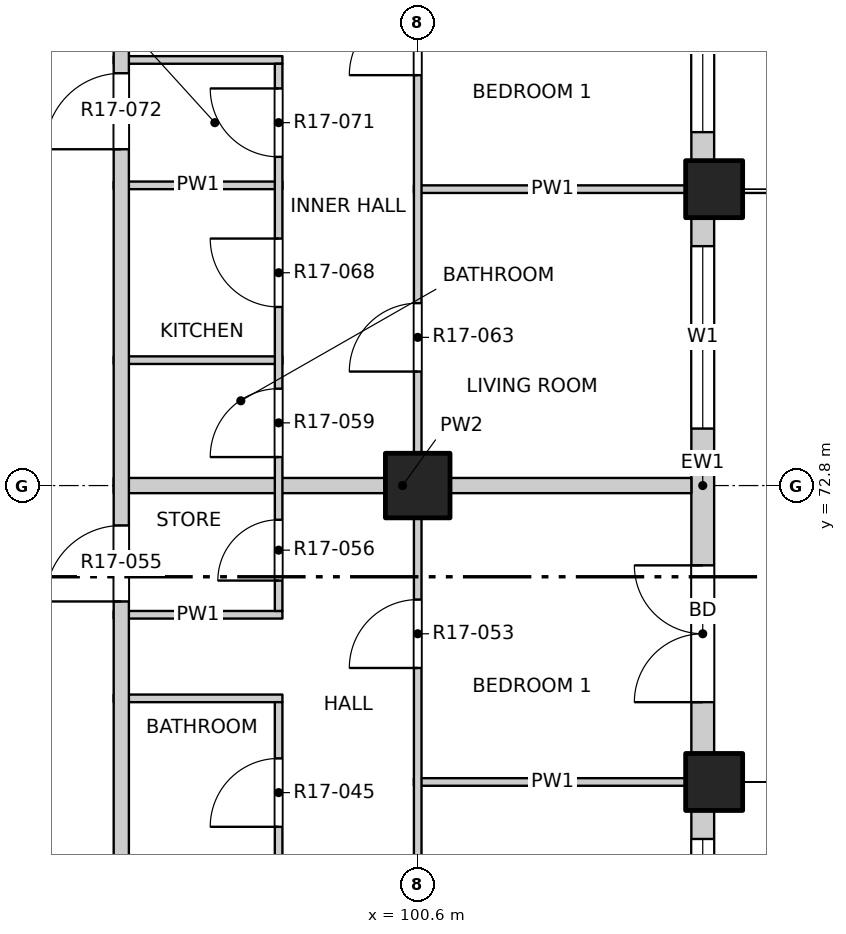
"""IFC4 building model, lengths in metres.
Left out: names, types, materials, properties, quantities, classifications, styles, units other than length and angle.
Written with IfcOpenShell. Run it as: python <this file> out.ifc"""

import sys

from ifc_helpers import new_model, si_unit, direction, frame, frame_2d, origin, origin_2d, place, context, subcontext, project, spatial, rectangle, extrude, element, fill, save


model = new_model("IFC4")
c1 = context("Model", 3, precision=1e-05, world=origin(), true_north=direction((0.0, 1.0)))
c2 = subcontext(c1, "Body", "Model", "MODEL_VIEW")
j1 = project(units=[si_unit("LENGTHUNIT", "METRE"), si_unit("PLANEANGLEUNIT", "RADIAN")], contexts=[c1])
p1 = place(None, origin())
s1 = spatial("IfcSite", under=j1, at=p1, CompositionType="ELEMENT")
p2 = place(p1, origin())
s2 = spatial("IfcBuilding", under=s1, at=p2, CompositionType="ELEMENT")
p3 = place(p2, frame((0.0, 0.0, 179.2)))
s3 = spatial("IfcBuildingStorey", under=s2, at=p3, CompositionType="ELEMENT", Elevation=179.2)
for number, where, z_axis, x_axis in (
    (1, (104.5, 68.9, -0.3), (0.0, 0.0, 1.0), (1.0, 0.0, 0.0)),
    (2, (104.5, 76.7, -0.3), (0.0, 0.0, 1.0), (1.0, 0.0, 0.0)),
):
    element("IfcColumn", number, at=place(p3, frame(where, z_axis=z_axis, x_axis=x_axis)), inside=s3, PredefinedType="COLUMN", context=c2, shape_type="SweptSolid", body=[
        extrude(rectangle(XDim=0.75, YDim=0.75, at=origin_2d()), origin(), (0.0, 0.0, 1.0), 3.45),
    ])
p4 = place(p3, frame((100.6, 72.8, -0.3), z_axis=(0.0, 0.0, 1.0), x_axis=(1.0, 0.0, 0.0)))
e3 = element("IfcColumn", 3, at=p4, inside=s3, PredefinedType="COLUMN", context=c2, shape_type="SweptSolid", body=[
    extrude(rectangle(XDim=0.85, YDim=0.85, at=origin_2d()), origin(), (0.0, 0.0, 1.0), 3.45),
])
p5 = place(p3, frame((104.35, 61.475, 0.0), z_axis=(0.0, 0.0, 1.0), x_axis=(0.0, 1.0, 0.0)))
e4 = element("IfcWall", 4, at=p5, inside=s3, PredefinedType="SOLIDWALL", context=c2, shape_type="SweptSolid", body=[
    extrude(rectangle(XDim=7.05, YDim=0.3, at=frame_2d((3.525, 0.0))), origin(), (0.0, 0.0, 1.0), 2.7),
])
p6 = place(p5, frame((0.675, 0.0, 0.0)))
e5 = element("IfcOpeningElement", 5, at=p6, cuts=e4, PredefinedType="OPENING", context=c2, shape_type="SweptSolid", body=[
    extrude(rectangle(XDim=1.8, YDim=2.4, at=frame_2d((0.9, 1.2))), frame((0.0, 0.16, 0.0), z_axis=(0.0, -1.0, 0.0), x_axis=(1.0, 0.0, 0.0)), (0.0, 0.0, 1.0), 0.32),
])
p7 = place(p5, frame((4.275, 0.0, 0.9)))
e6 = element("IfcOpeningElement", 6, at=p7, cuts=e4, PredefinedType="OPENING", context=c2, shape_type="SweptSolid", body=[
    extrude(rectangle(XDim=2.4, YDim=1.8, at=frame_2d((1.2, 0.9))), frame((0.0, 0.16, 0.0), z_axis=(0.0, -1.0, 0.0), x_axis=(1.0, 0.0, 0.0)), (0.0, 0.0, 1.0), 0.32),
])
p8 = place(p3, frame((104.35, 69.275, 0.0), z_axis=(0.0, 0.0, 1.0), x_axis=(0.0, 1.0, 0.0)))
e7 = element("IfcWall", 7, at=p8, inside=s3, PredefinedType="SOLIDWALL", context=c2, shape_type="SweptSolid", body=[
    extrude(rectangle(XDim=7.05, YDim=0.3, at=frame_2d((3.525, 0.0))), origin(), (0.0, 0.0, 1.0), 2.7),
])
p9 = place(p8, frame((0.675, 0.0, 0.0)))
e8 = element("IfcOpeningElement", 8, at=p9, cuts=e7, PredefinedType="OPENING", context=c2, shape_type="SweptSolid", body=[
    extrude(rectangle(XDim=1.8, YDim=2.4, at=frame_2d((0.9, 1.2))), frame((0.0, 0.16, 0.0), z_axis=(0.0, -1.0, 0.0), x_axis=(1.0, 0.0, 0.0)), (0.0, 0.0, 1.0), 0.32),
])
p10 = place(p8, frame((4.275, 0.0, 0.9)))
e9 = element("IfcOpeningElement", 9, at=p10, cuts=e7, PredefinedType="OPENING", context=c2, shape_type="SweptSolid", body=[
    extrude(rectangle(XDim=2.4, YDim=1.8, at=frame_2d((1.2, 0.9))), frame((0.0, 0.16, 0.0), z_axis=(0.0, -1.0, 0.0), x_axis=(1.0, 0.0, 0.0)), (0.0, 0.0, 1.0), 0.32),
])
p11 = place(p3, frame((104.35, 77.075, 0.0), z_axis=(0.0, 0.0, 1.0), x_axis=(0.0, 1.0, 0.0)))
e10 = element("IfcWall", 10, at=p11, inside=s3, PredefinedType="SOLIDWALL", context=c2, shape_type="SweptSolid", body=[
    extrude(rectangle(XDim=3.525, YDim=0.3, at=frame_2d((1.763, 0.0))), origin(), (0.0, 0.0, 1.0), 2.7),
])
p12 = place(p11, frame((0.375, 0.0, 0.9)))
e11 = element("IfcOpeningElement", 11, at=p12, cuts=e10, PredefinedType="OPENING", context=c2, shape_type="SweptSolid", body=[
    extrude(rectangle(XDim=2.4, YDim=1.8, at=frame_2d((1.2, 0.9))), frame((0.0, 0.16, 0.0), z_axis=(0.0, -1.0, 0.0), x_axis=(1.0, 0.0, 0.0)), (0.0, 0.0, 1.0), 0.32),
])
p13 = place(p3, frame((100.55, 68.9, 0.0), z_axis=(0.0, 0.0, 1.0), x_axis=(1.0, 0.0, 0.0)))
e12 = element("IfcWall", 12, at=p13, inside=s3, PredefinedType="PARTITIONING", context=c2, shape_type="SweptSolid", body=[
    extrude(rectangle(XDim=3.65, YDim=0.1, at=frame_2d((1.825, 0.0))), origin(), (0.0, 0.0, 1.0), 2.55),
])
for number, where, z_axis, x_axis in (
    (13, (96.6, 70.0, 0.0), (0.0, 0.0, 1.0), (1.0, 0.0, 0.0)),
    (14, (96.6, 71.1, 0.0), (0.0, 0.0, 1.0), (1.0, 0.0, 0.0)),
):
    element("IfcWall", number, at=place(p3, frame(where, z_axis=z_axis, x_axis=x_axis)), inside=s3, PredefinedType="PARTITIONING", context=c2, shape_type="SweptSolid", body=[
        extrude(rectangle(XDim=2.22, YDim=0.1, at=frame_2d((1.11, 0.0))), origin(), (0.0, 0.0, 1.0), 3.15),
    ])
p14 = place(p3, frame((96.6, 72.8, 0.0), z_axis=(0.0, 0.0, 1.0), x_axis=(1.0, 0.0, 0.0)))
e15 = element("IfcWall", 15, at=p14, inside=s3, PredefinedType="PARTITIONING", context=c2, shape_type="SweptSolid", body=[
    extrude(rectangle(XDim=7.6, YDim=0.2, at=frame_2d((3.8, 0.0))), origin(), (0.0, 0.0, 1.0), 3.15),
])
p15 = place(p3, frame((96.6, 74.45, 0.0), z_axis=(0.0, 0.0, 1.0), x_axis=(1.0, 0.0, 0.0)))
e16 = element("IfcWall", 16, at=p15, inside=s3, PredefinedType="PARTITIONING", context=c2, shape_type="SweptSolid", body=[
    extrude(rectangle(XDim=2.22, YDim=0.1, at=frame_2d((1.11, 0.0))), origin(), (0.0, 0.0, 1.0), 3.15),
])
p16 = place(p3, frame((100.55, 76.7, 0.0), z_axis=(0.0, 0.0, 1.0), x_axis=(1.0, 0.0, 0.0)))
e17 = element("IfcWall", 17, at=p16, inside=s3, PredefinedType="PARTITIONING", context=c2, shape_type="SweptSolid", body=[
    extrude(rectangle(XDim=3.65, YDim=0.1, at=frame_2d((1.825, 0.0))), origin(), (0.0, 0.0, 1.0), 2.55),
])
p17 = place(p3, frame((96.6, 76.75, 0.0), z_axis=(0.0, 0.0, 1.0), x_axis=(1.0, 0.0, 0.0)))
e18 = element("IfcWall", 18, at=p17, inside=s3, PredefinedType="PARTITIONING", context=c2, shape_type="SweptSolid", body=[
    extrude(rectangle(XDim=2.22, YDim=0.1, at=frame_2d((1.11, 0.0))), origin(), (0.0, 0.0, 1.0), 2.55),
])
p18 = place(p3, frame((96.6, 78.4, 0.0), z_axis=(0.0, 0.0, 1.0), x_axis=(1.0, 0.0, 0.0)))
e19 = element("IfcWall", 19, at=p18, inside=s3, PredefinedType="PARTITIONING", context=c2, shape_type="SweptSolid", body=[
    extrude(rectangle(XDim=2.22, YDim=0.1, at=frame_2d((1.11, 0.0))), origin(), (0.0, 0.0, 1.0), 3.15),
])
p19 = place(p3, frame((96.7, 49.5, 0.0), z_axis=(0.0, 0.0, 1.0), x_axis=(0.0, 1.0, 0.0)))
e20 = element("IfcWall", 20, at=p19, inside=s3, PredefinedType="PARTITIONING", context=c2, shape_type="SweptSolid", body=[
    extrude(rectangle(XDim=34.7, YDim=0.2, at=frame_2d((17.35, 0.0))), origin(), (0.0, 0.0, 1.0), 3.15),
])
p20 = place(p19, frame((6.875, 0.0, 0.0)))
e21 = element("IfcOpeningElement", 21, at=p20, cuts=e20, PredefinedType="OPENING", context=c2, shape_type="SweptSolid", body=[
    extrude(rectangle(XDim=1.0, YDim=2.1, at=frame_2d((0.5, 1.05))), frame((0.0, 0.11, 0.0), z_axis=(0.0, -1.0, 0.0), x_axis=(1.0, 0.0, 0.0)), (0.0, 0.0, 1.0), 0.22),
])
p21 = place(p19, frame((21.775, 0.0, 0.0)))
e22 = element("IfcOpeningElement", 22, at=p21, cuts=e20, PredefinedType="OPENING", context=c2, shape_type="SweptSolid", body=[
    extrude(rectangle(XDim=1.0, YDim=2.1, at=frame_2d((0.5, 1.05))), frame((0.0, 0.11, 0.0), z_axis=(0.0, -1.0, 0.0), x_axis=(1.0, 0.0, 0.0)), (0.0, 0.0, 1.0), 0.22),
])
p22 = place(p19, frame((27.725, 0.0, 0.0)))
e23 = element("IfcOpeningElement", 23, at=p22, cuts=e20, PredefinedType="OPENING", context=c2, shape_type="SweptSolid", body=[
    extrude(rectangle(XDim=1.0, YDim=2.1, at=frame_2d((0.5, 1.05))), frame((0.0, 0.11, 0.0), z_axis=(0.0, -1.0, 0.0), x_axis=(1.0, 0.0, 0.0)), (0.0, 0.0, 1.0), 0.22),
])
p23 = place(p3, frame((98.77, 56.25, 0.0), z_axis=(0.0, 0.0, 1.0), x_axis=(0.0, 1.0, 0.0)))
e24 = element("IfcWall", 24, at=p23, inside=s3, PredefinedType="PARTITIONING", context=c2, shape_type="SweptSolid", body=[
    extrude(rectangle(XDim=13.7, YDim=0.1, at=frame_2d((6.85, 0.0))), origin(), (0.0, 0.0, 1.0), 3.15),
])
p24 = place(p23, frame((0.325, 0.0, 0.0)))
e25 = element("IfcOpeningElement", 25, at=p24, cuts=e24, PredefinedType="OPENING", context=c2, shape_type="SweptSolid", body=[
    extrude(rectangle(XDim=0.8, YDim=2.1, at=frame_2d((0.4, 1.05))), frame((0.0, 0.06, 0.0), z_axis=(0.0, -1.0, 0.0), x_axis=(1.0, 0.0, 0.0)), (0.0, 0.0, 1.0), 0.12),
])
p25 = place(p23, frame((1.95, 0.0, 0.0)))
e26 = element("IfcOpeningElement", 26, at=p25, cuts=e24, PredefinedType="OPENING", context=c2, shape_type="SweptSolid", body=[
    extrude(rectangle(XDim=0.9, YDim=2.1, at=frame_2d((0.45, 1.05))), frame((0.0, 0.06, 0.0), z_axis=(0.0, -1.0, 0.0), x_axis=(1.0, 0.0, 0.0)), (0.0, 0.0, 1.0), 0.12),
])
p26 = place(p23, frame((3.675, 0.0, 0.0)))
e27 = element("IfcOpeningElement", 27, at=p26, cuts=e24, PredefinedType="OPENING", context=c2, shape_type="SweptSolid", body=[
    extrude(rectangle(XDim=0.8, YDim=2.1, at=frame_2d((0.4, 1.05))), frame((0.0, 0.06, 0.0), z_axis=(0.0, -1.0, 0.0), x_axis=(1.0, 0.0, 0.0)), (0.0, 0.0, 1.0), 0.12),
])
p27 = place(p23, frame((6.16, 0.0, 0.0)))
e28 = element("IfcOpeningElement", 28, at=p27, cuts=e24, PredefinedType="OPENING", context=c2, shape_type="SweptSolid", body=[
    extrude(rectangle(XDim=0.9, YDim=2.1, at=frame_2d((0.45, 1.05))), frame((0.0, 0.06, 0.0), z_axis=(0.0, -1.0, 0.0), x_axis=(1.0, 0.0, 0.0)), (0.0, 0.0, 1.0), 0.12),
])
p28 = place(p23, frame((9.42, 0.0, 0.0)))
e29 = element("IfcOpeningElement", 29, at=p28, cuts=e24, PredefinedType="OPENING", context=c2, shape_type="SweptSolid", body=[
    extrude(rectangle(XDim=0.8, YDim=2.1, at=frame_2d((0.4, 1.05))), frame((0.0, 0.06, 0.0), z_axis=(0.0, -1.0, 0.0), x_axis=(1.0, 0.0, 0.0)), (0.0, 0.0, 1.0), 0.12),
])
p29 = place(p23, frame((12.06, 0.0, 0.0)))
e30 = element("IfcOpeningElement", 30, at=p29, cuts=e24, PredefinedType="OPENING", context=c2, shape_type="SweptSolid", body=[
    extrude(rectangle(XDim=0.9, YDim=2.1, at=frame_2d((0.45, 1.05))), frame((0.0, 0.06, 0.0), z_axis=(0.0, -1.0, 0.0), x_axis=(1.0, 0.0, 0.0)), (0.0, 0.0, 1.0), 0.12),
])
p30 = place(p3, frame((98.77, 71.15, 0.0), z_axis=(0.0, 0.0, 1.0), x_axis=(0.0, 1.0, 0.0)))
e31 = element("IfcWall", 31, at=p30, inside=s3, PredefinedType="PARTITIONING", context=c2, shape_type="SweptSolid", body=[
    extrude(rectangle(XDim=7.2, YDim=0.1, at=frame_2d((3.6, 0.0))), origin(), (0.0, 0.0, 1.0), 3.15),
])
p31 = place(p30, frame((0.4, 0.0, 0.0)))
e32 = element("IfcOpeningElement", 32, at=p31, cuts=e31, PredefinedType="OPENING", context=c2, shape_type="SweptSolid", body=[
    extrude(rectangle(XDim=0.8, YDim=2.1, at=frame_2d((0.4, 1.05))), frame((0.0, 0.06, 0.0), z_axis=(0.0, -1.0, 0.0), x_axis=(1.0, 0.0, 0.0)), (0.0, 0.0, 1.0), 0.12),
])
p32 = place(p30, frame((2.025, 0.0, 0.0)))
e33 = element("IfcOpeningElement", 33, at=p32, cuts=e31, PredefinedType="OPENING", context=c2, shape_type="SweptSolid", body=[
    extrude(rectangle(XDim=0.9, YDim=2.1, at=frame_2d((0.45, 1.05))), frame((0.0, 0.06, 0.0), z_axis=(0.0, -1.0, 0.0), x_axis=(1.0, 0.0, 0.0)), (0.0, 0.0, 1.0), 0.12),
])
p33 = place(p30, frame((4.0, 0.0, 0.0)))
e34 = element("IfcOpeningElement", 34, at=p33, cuts=e31, PredefinedType="OPENING", context=c2, shape_type="SweptSolid", body=[
    extrude(rectangle(XDim=0.9, YDim=2.1, at=frame_2d((0.45, 1.05))), frame((0.0, 0.06, 0.0), z_axis=(0.0, -1.0, 0.0), x_axis=(1.0, 0.0, 0.0)), (0.0, 0.0, 1.0), 0.12),
])
p34 = place(p30, frame((5.975, 0.0, 0.0)))
e35 = element("IfcOpeningElement", 35, at=p34, cuts=e31, PredefinedType="OPENING", context=c2, shape_type="SweptSolid", body=[
    extrude(rectangle(XDim=0.9, YDim=2.1, at=frame_2d((0.45, 1.05))), frame((0.0, 0.06, 0.0), z_axis=(0.0, -1.0, 0.0), x_axis=(1.0, 0.0, 0.0)), (0.0, 0.0, 1.0), 0.12),
])
p35 = place(p3, frame((100.6, 45.8, 0.0), z_axis=(0.0, 0.0, 1.0), x_axis=(0.0, 1.0, 0.0)))
e36 = element("IfcWall", 36, at=p35, inside=s3, PredefinedType="PARTITIONING", context=c2, shape_type="SweptSolid", body=[
    extrude(rectangle(XDim=38.4, YDim=0.1, at=frame_2d((19.2, 0.0))), origin(), (0.0, 0.0, 1.0), 3.15),
])
p36 = place(p35, frame((1.05, 0.0, 0.0)))
e37 = element("IfcOpeningElement", 37, at=p36, cuts=e36, PredefinedType="OPENING", context=c2, shape_type="SweptSolid", body=[
    extrude(rectangle(XDim=1.2, YDim=2.1, at=frame_2d((0.6, 1.05))), frame((0.0, 0.06, 0.0), z_axis=(0.0, -1.0, 0.0), x_axis=(1.0, 0.0, 0.0)), (0.0, 0.0, 1.0), 0.12),
])
p37 = place(p35, frame((5.1, 0.0, 0.0)))
e38 = element("IfcOpeningElement", 38, at=p37, cuts=e36, PredefinedType="OPENING", context=c2, shape_type="SweptSolid", body=[
    extrude(rectangle(XDim=0.9, YDim=2.1, at=frame_2d((0.45, 1.05))), frame((0.0, 0.06, 0.0), z_axis=(0.0, -1.0, 0.0), x_axis=(1.0, 0.0, 0.0)), (0.0, 0.0, 1.0), 0.12),
])
p38 = place(p35, frame((9.0, 0.0, 0.0)))
e39 = element("IfcOpeningElement", 39, at=p38, cuts=e36, PredefinedType="OPENING", context=c2, shape_type="SweptSolid", body=[
    extrude(rectangle(XDim=0.9, YDim=2.1, at=frame_2d((0.45, 1.05))), frame((0.0, 0.06, 0.0), z_axis=(0.0, -1.0, 0.0), x_axis=(1.0, 0.0, 0.0)), (0.0, 0.0, 1.0), 0.12),
])
p39 = place(p35, frame((12.9, 0.0, 0.0)))
e40 = element("IfcOpeningElement", 40, at=p39, cuts=e36, PredefinedType="OPENING", context=c2, shape_type="SweptSolid", body=[
    extrude(rectangle(XDim=0.9, YDim=2.1, at=frame_2d((0.45, 1.05))), frame((0.0, 0.06, 0.0), z_axis=(0.0, -1.0, 0.0), x_axis=(1.0, 0.0, 0.0)), (0.0, 0.0, 1.0), 0.12),
])
p40 = place(p35, frame((19.725, 0.0, 0.0)))
e41 = element("IfcOpeningElement", 41, at=p40, cuts=e36, PredefinedType="OPENING", context=c2, shape_type="SweptSolid", body=[
    extrude(rectangle(XDim=1.2, YDim=2.1, at=frame_2d((0.6, 1.05))), frame((0.0, 0.06, 0.0), z_axis=(0.0, -1.0, 0.0), x_axis=(1.0, 0.0, 0.0)), (0.0, 0.0, 1.0), 0.12),
])
p41 = place(p35, frame((24.6, 0.0, 0.0)))
e42 = element("IfcOpeningElement", 42, at=p41, cuts=e36, PredefinedType="OPENING", context=c2, shape_type="SweptSolid", body=[
    extrude(rectangle(XDim=0.9, YDim=2.1, at=frame_2d((0.45, 1.05))), frame((0.0, 0.06, 0.0), z_axis=(0.0, -1.0, 0.0), x_axis=(1.0, 0.0, 0.0)), (0.0, 0.0, 1.0), 0.12),
])
p42 = place(p35, frame((28.5, 0.0, 0.0)))
e43 = element("IfcOpeningElement", 43, at=p42, cuts=e36, PredefinedType="OPENING", context=c2, shape_type="SweptSolid", body=[
    extrude(rectangle(XDim=0.9, YDim=2.1, at=frame_2d((0.45, 1.05))), frame((0.0, 0.06, 0.0), z_axis=(0.0, -1.0, 0.0), x_axis=(1.0, 0.0, 0.0)), (0.0, 0.0, 1.0), 0.12),
])
p43 = place(p35, frame((32.4, 0.0, 0.0)))
e44 = element("IfcOpeningElement", 44, at=p43, cuts=e36, PredefinedType="OPENING", context=c2, shape_type="SweptSolid", body=[
    extrude(rectangle(XDim=0.9, YDim=2.1, at=frame_2d((0.45, 1.05))), frame((0.0, 0.06, 0.0), z_axis=(0.0, -1.0, 0.0), x_axis=(1.0, 0.0, 0.0)), (0.0, 0.0, 1.0), 0.12),
])
p44 = place(p35, frame((36.15, 0.0, 0.0)))
e45 = element("IfcOpeningElement", 45, at=p44, cuts=e36, PredefinedType="OPENING", context=c2, shape_type="SweptSolid", body=[
    extrude(rectangle(XDim=1.2, YDim=2.1, at=frame_2d((0.6, 1.05))), frame((0.0, 0.06, 0.0), z_axis=(0.0, -1.0, 0.0), x_axis=(1.0, 0.0, 0.0)), (0.0, 0.0, 1.0), 0.12),
])
p45 = place(p7, origin())
e46 = element("IfcWindow", 46, at=p45, inside=s3, PartitioningType="DOUBLE_PANEL_VERTICAL", PredefinedType="WINDOW", context=c2, shape_type="SweptSolid", body=[
    extrude(rectangle(XDim=2.4, YDim=1.8, at=frame_2d((1.2, 0.9))), frame((0.0, 0.03, 0.0), z_axis=(0.0, -1.0, 0.0), x_axis=(1.0, 0.0, 0.0)), (0.0, 0.0, 1.0), 0.06),
])
fill(e6, e46)
p46 = place(p9, origin())
e47 = element("IfcDoor", 47, at=p46, inside=s3, OperationType="DOUBLE_DOOR_SINGLE_SWING", PredefinedType="DOOR", context=c2, shape_type="SweptSolid", body=[
    extrude(rectangle(XDim=1.8, YDim=2.4, at=frame_2d((0.9, 1.2))), frame((0.0, 0.025, 0.0), z_axis=(0.0, -1.0, 0.0), x_axis=(1.0, 0.0, 0.0)), (0.0, 0.0, 1.0), 0.05),
])
fill(e8, e47)
p47 = place(p10, origin())
e48 = element("IfcWindow", 48, at=p47, inside=s3, PartitioningType="DOUBLE_PANEL_VERTICAL", PredefinedType="WINDOW", context=c2, shape_type="SweptSolid", body=[
    extrude(rectangle(XDim=2.4, YDim=1.8, at=frame_2d((1.2, 0.9))), frame((0.0, 0.03, 0.0), z_axis=(0.0, -1.0, 0.0), x_axis=(1.0, 0.0, 0.0)), (0.0, 0.0, 1.0), 0.06),
])
fill(e9, e48)
p48 = place(p12, origin())
e49 = element("IfcWindow", 49, at=p48, inside=s3, PartitioningType="DOUBLE_PANEL_VERTICAL", PredefinedType="WINDOW", context=c2, shape_type="SweptSolid", body=[
    extrude(rectangle(XDim=2.4, YDim=1.8, at=frame_2d((1.2, 0.9))), frame((0.0, 0.03, 0.0), z_axis=(0.0, -1.0, 0.0), x_axis=(1.0, 0.0, 0.0)), (0.0, 0.0, 1.0), 0.06),
])
fill(e11, e49)
p49 = place(p29, origin())
e50 = element("IfcDoor", 50, at=p49, inside=s3, OperationType="SINGLE_SWING_LEFT", PredefinedType="DOOR", context=c2, shape_type="SweptSolid", body=[
    extrude(rectangle(XDim=0.9, YDim=2.1, at=frame_2d((0.45, 1.05))), frame((0.0, 0.025, 0.0), z_axis=(0.0, -1.0, 0.0), x_axis=(1.0, 0.0, 0.0)), (0.0, 0.0, 1.0), 0.05),
])
fill(e30, e50)
p50 = place(p41, origin())
e51 = element("IfcDoor", 51, at=p50, inside=s3, OperationType="SINGLE_SWING_LEFT", PredefinedType="DOOR", context=c2, shape_type="SweptSolid", body=[
    extrude(rectangle(XDim=0.9, YDim=2.1, at=frame_2d((0.45, 1.05))), frame((0.0, 0.025, 0.0), z_axis=(0.0, -1.0, 0.0), x_axis=(1.0, 0.0, 0.0)), (0.0, 0.0, 1.0), 0.05),
])
fill(e42, e51)
p51 = place(p21, origin())
e52 = element("IfcDoor", 52, at=p51, inside=s3, OperationType="SINGLE_SWING_LEFT", PredefinedType="DOOR", context=c2, shape_type="SweptSolid", body=[
    extrude(rectangle(XDim=1.0, YDim=2.1, at=frame_2d((0.5, 1.05))), frame((0.0, 0.025, 0.0), z_axis=(0.0, -1.0, 0.0), x_axis=(1.0, 0.0, 0.0)), (0.0, 0.0, 1.0), 0.05),
])
fill(e22, e52)
p52 = place(p31, origin())
e53 = element("IfcDoor", 53, at=p52, inside=s3, OperationType="SINGLE_SWING_LEFT", PredefinedType="DOOR", context=c2, shape_type="SweptSolid", body=[
    extrude(rectangle(XDim=0.8, YDim=2.1, at=frame_2d((0.4, 1.05))), frame((0.0, 0.025, 0.0), z_axis=(0.0, -1.0, 0.0), x_axis=(1.0, 0.0, 0.0)), (0.0, 0.0, 1.0), 0.05),
])
fill(e32, e53)
p53 = place(p32, origin())
e54 = element("IfcDoor", 54, at=p53, inside=s3, OperationType="SINGLE_SWING_LEFT", PredefinedType="DOOR", context=c2, shape_type="SweptSolid", body=[
    extrude(rectangle(XDim=0.9, YDim=2.1, at=frame_2d((0.45, 1.05))), frame((0.0, 0.025, 0.0), z_axis=(0.0, -1.0, 0.0), x_axis=(1.0, 0.0, 0.0)), (0.0, 0.0, 1.0), 0.05),
])
fill(e33, e54)
p54 = place(p42, origin())
e55 = element("IfcDoor", 55, at=p54, inside=s3, OperationType="SINGLE_SWING_LEFT", PredefinedType="DOOR", context=c2, shape_type="SweptSolid", body=[
    extrude(rectangle(XDim=0.9, YDim=2.1, at=frame_2d((0.45, 1.05))), frame((0.0, 0.025, 0.0), z_axis=(0.0, -1.0, 0.0), x_axis=(1.0, 0.0, 0.0)), (0.0, 0.0, 1.0), 0.05),
])
fill(e43, e55)
p55 = place(p33, origin())
e56 = element("IfcDoor", 56, at=p55, inside=s3, OperationType="SINGLE_SWING_RIGHT", PredefinedType="DOOR", context=c2, shape_type="SweptSolid", body=[
    extrude(rectangle(XDim=0.9, YDim=2.1, at=frame_2d((0.45, 1.05))), frame((0.0, 0.025, 0.0), z_axis=(0.0, -1.0, 0.0), x_axis=(1.0, 0.0, 0.0)), (0.0, 0.0, 1.0), 0.05),
])
fill(e34, e56)
p56 = place(p34, origin())
e57 = element("IfcDoor", 57, at=p56, inside=s3, OperationType="SINGLE_SWING_RIGHT", PredefinedType="DOOR", context=c2, shape_type="SweptSolid", body=[
    extrude(rectangle(XDim=0.9, YDim=2.1, at=frame_2d((0.45, 1.05))), frame((0.0, 0.025, 0.0), z_axis=(0.0, -1.0, 0.0), x_axis=(1.0, 0.0, 0.0)), (0.0, 0.0, 1.0), 0.05),
])
fill(e35, e57)
p57 = place(p22, origin())
e58 = element("IfcDoor", 58, at=p57, inside=s3, OperationType="SINGLE_SWING_RIGHT", PredefinedType="DOOR", context=c2, shape_type="SweptSolid", body=[
    extrude(rectangle(XDim=1.0, YDim=2.1, at=frame_2d((0.5, 1.05))), frame((0.0, 0.025, 0.0), z_axis=(0.0, -1.0, 0.0), x_axis=(1.0, 0.0, 0.0)), (0.0, 0.0, 1.0), 0.05),
])
fill(e23, e58)
p58 = place(p43, origin())
e59 = element("IfcDoor", 59, at=p58, inside=s3, OperationType="SINGLE_SWING_LEFT", PredefinedType="DOOR", context=c2, shape_type="SweptSolid", body=[
    extrude(rectangle(XDim=0.9, YDim=2.1, at=frame_2d((0.45, 1.05))), frame((0.0, 0.025, 0.0), z_axis=(0.0, -1.0, 0.0), x_axis=(1.0, 0.0, 0.0)), (0.0, 0.0, 1.0), 0.05),
])
fill(e44, e59)
save(model, sys.argv[1])
